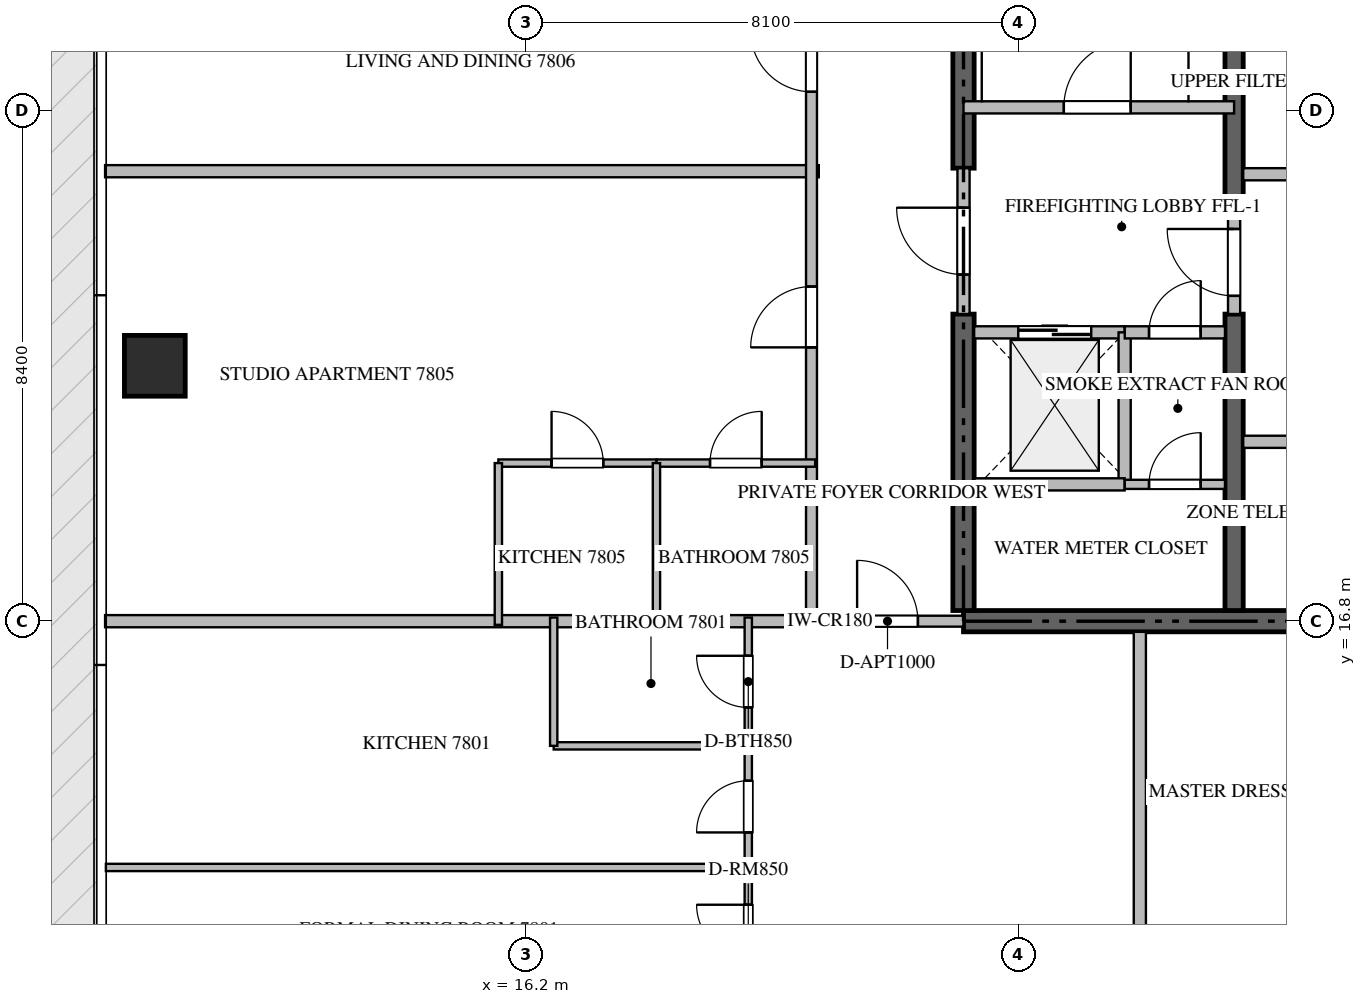
"""IFC4 building model, lengths in metres.
Left out: names, types, materials, properties, quantities, classifications, styles, units other than length and angle.
Written with IfcOpenShell. Run it as: python <this file> out.ifc"""

import sys

from ifc_helpers import new_model, si_unit, direction, frame, frame_2d, origin, origin_2d, place, context, subcontext, project, spatial, rectangle, extrude, source, transform, mapped, element, fill, save


model = new_model("IFC4")
c1 = context("Model", 3, precision=1e-05, world=origin(), true_north=direction((0.0, 1.0)))
c2 = subcontext(c1, "Body", "Model", "MODEL_VIEW")
j1 = project(units=[si_unit("LENGTHUNIT", "METRE"), si_unit("PLANEANGLEUNIT", "RADIAN")], contexts=[c1])
p1 = place(None, origin())
s1 = spatial("IfcSite", under=j1, at=p1, CompositionType="ELEMENT")
p2 = place(p1, origin())
s2 = spatial("IfcBuilding", under=s1, at=p2, CompositionType="ELEMENT")
p3 = place(p2, frame((0.0, 0.0, 313.7)))
s3 = spatial("IfcBuildingStorey", under=s2, at=p3, CompositionType="ELEMENT", Elevation=313.7)
p4 = place(p3, frame((23.4, 16.8, -0.26), z_axis=(0.0, 0.0, 1.0), x_axis=(1.0, 0.0, 0.0)))
e1 = element("IfcWall", 1, at=p4, inside=s3, PredefinedType="SHEAR", context=c2, shape_type="SweptSolid", body=[
    extrude(rectangle(XDim=18.0, YDim=0.35, at=frame_2d((9.0, 0.0))), origin(), (0.0, 0.0, 1.0), 4.048),
])
p5 = place(p3, frame((23.4, 16.975, -0.26), z_axis=(0.0, 0.0, 1.0), x_axis=(0.0, 1.0, 0.0)))
e2 = element("IfcWall", 2, at=p5, inside=s3, PredefinedType="SHEAR", context=c2, shape_type="SweptSolid", body=[
    extrude(rectangle(XDim=4.875, YDim=0.35, at=frame_2d((2.438, 0.0))), origin(), (0.0, 0.0, 1.0), 4.048),
])
p6 = place(p3, frame((23.4, 24.25, -0.26), z_axis=(0.0, 0.0, 1.0), x_axis=(0.0, 1.0, 0.0)))
e3 = element("IfcWall", 3, at=p6, inside=s3, PredefinedType="SHEAR", context=c2, shape_type="SweptSolid", body=[
    extrude(rectangle(XDim=9.175, YDim=0.35, at=frame_2d((4.587, 0.0))), origin(), (0.0, 0.0, 1.0), 4.048),
])
p7 = place(p3, frame((27.85, 16.975, -0.26), z_axis=(0.0, 0.0, 1.0), x_axis=(0.0, 1.0, 0.0)))
e4 = element("IfcWall", 4, at=p7, inside=s3, PredefinedType="SHEAR", context=c2, shape_type="SweptSolid", body=[
    extrude(rectangle(XDim=4.875, YDim=0.3, at=frame_2d((2.438, 0.0))), origin(), (0.0, 0.0, 1.0), 4.048),
])
p8 = place(p3, frame((27.85, 23.55, -0.26), z_axis=(0.0, 0.0, 1.0), x_axis=(0.0, 1.0, 0.0)))
e5 = element("IfcWall", 5, at=p8, inside=s3, PredefinedType="SHEAR", context=c2, shape_type="SweptSolid", body=[
    extrude(rectangle(XDim=9.875, YDim=0.3, at=frame_2d((4.938, 0.0))), origin(), (0.0, 0.0, 1.0), 4.048),
])
m1 = source(origin(), c2, "Body", "SweptSolid", [
    extrude(rectangle(XDim=1.0, YDim=1.0, at=origin_2d()), origin(), (0.0, 0.0, 1.0), 4.05),
])
p9 = place(p3, frame((10.1, 21.0, -0.26), z_axis=(0.0, 0.0, 1.0), x_axis=(1.0, 0.0, 0.0)))
e6 = element("IfcColumn", 6, at=p9, inside=s3, PredefinedType="COLUMN", context=c2, shape_type="MappedRepresentation", body=[
    mapped(m1, transform((0.0, 0.0, 0.0), scale=1.0)),
])
p10 = place(p3, frame((23.4, 25.25, 0.0), z_axis=(0.0, 0.0, 1.0), x_axis=(1.0, 0.0, 0.0)))
e7 = element("IfcWall", 7, at=p10, inside=s3, PredefinedType="STANDARD", context=c2, shape_type="SweptSolid", body=[
    extrude(rectangle(XDim=4.45, YDim=0.2, at=frame_2d((2.225, 0.0))), origin(), (0.0, 0.0, 1.0), 3.79),
])
p11 = place(p10, frame((1.65, 0.0, 0.0)))
e8 = element("IfcOpeningElement", 8, at=p11, cuts=e7, PredefinedType="OPENING", context=c2, shape_type="SweptSolid", body=[
    extrude(rectangle(XDim=1.1, YDim=2.15, at=frame_2d((0.55, 1.075))), frame((0.0, 0.11, 0.0), z_axis=(0.0, -1.0, 0.0), x_axis=(1.0, 0.0, 0.0)), (0.0, 0.0, 1.0), 0.22),
])
p12 = place(p3, frame((23.575, 21.55, 0.0), z_axis=(0.0, 0.0, 1.0), x_axis=(1.0, 0.0, 0.0)))
e9 = element("IfcWall", 9, at=p12, inside=s3, PredefinedType="STANDARD", context=c2, shape_type="SweptSolid", body=[
    extrude(rectangle(XDim=2.475, YDim=0.2, at=frame_2d((1.238, 0.0))), origin(), (0.0, 0.0, 1.0), 3.79),
])
p13 = place(p12, frame((0.725, 0.0, 0.0)))
e10 = element("IfcOpeningElement", 10, at=p13, cuts=e9, PredefinedType="OPENING", context=c2, shape_type="SweptSolid", body=[
    extrude(rectangle(XDim=1.2, YDim=2.2, at=frame_2d((0.6, 1.1))), frame((0.0, 0.11, 0.0), z_axis=(0.0, -1.0, 0.0), x_axis=(1.0, 0.0, 0.0)), (0.0, 0.0, 1.0), 0.22),
])
p14 = place(p3, frame((26.05, 19.05, 0.0), z_axis=(0.0, 0.0, 1.0), x_axis=(0.0, 1.0, 0.0)))
e11 = element("IfcWall", 11, at=p14, inside=s3, PredefinedType="STANDARD", context=c2, shape_type="SweptSolid", body=[
    extrude(rectangle(XDim=2.5, YDim=0.2, at=frame_2d((1.25, 0.0))), origin(), (0.0, 0.0, 1.0), 3.79),
])
p15 = place(p3, frame((23.575, 19.05, 0.0), z_axis=(0.0, 0.0, 1.0), x_axis=(1.0, 0.0, 0.0)))
e12 = element("IfcWall", 12, at=p15, inside=s3, PredefinedType="STANDARD", context=c2, shape_type="SweptSolid", body=[
    extrude(rectangle(XDim=2.475, YDim=0.2, at=frame_2d((1.238, 0.0))), origin(), (0.0, 0.0, 1.0), 3.79),
])
p16 = place(p3, frame((26.052, 21.55, 0.0), z_axis=(0.0, 0.0, 1.0), x_axis=(1.0, 0.0, 0.0)))
e13 = element("IfcWall", 13, at=p16, inside=s3, PredefinedType="STANDARD", context=c2, shape_type="SweptSolid", body=[
    extrude(rectangle(XDim=1.648, YDim=0.2, at=frame_2d((0.824, 0.0))), origin(), (0.0, 0.0, 1.0), 3.79),
])
p17 = place(p16, frame((0.399, 0.0, 0.0)))
e14 = element("IfcOpeningElement", 14, at=p17, cuts=e13, PredefinedType="OPENING", context=c2, shape_type="SweptSolid", body=[
    extrude(rectangle(XDim=0.85, YDim=2.1, at=frame_2d((0.425, 1.05))), frame((0.0, 0.11, 0.0), z_axis=(0.0, -1.0, 0.0), x_axis=(1.0, 0.0, 0.0)), (0.0, 0.0, 1.0), 0.22),
])
p18 = place(p3, frame((23.4, 21.852, 0.0), z_axis=(0.0, 0.0, 1.0), x_axis=(0.0, 1.0, 0.0)))
e15 = element("IfcWall", 15, at=p18, inside=s3, PredefinedType="STANDARD", context=c2, shape_type="SweptSolid", body=[
    extrude(rectangle(XDim=2.396, YDim=0.2, at=frame_2d((1.198, 0.0))), origin(), (0.0, 0.0, 1.0), 3.79),
])
p19 = place(p18, frame((0.648, 0.0, 0.0)))
e16 = element("IfcOpeningElement", 16, at=p19, cuts=e15, PredefinedType="OPENING", context=c2, shape_type="SweptSolid", body=[
    extrude(rectangle(XDim=1.1, YDim=2.15, at=frame_2d((0.55, 1.075))), frame((0.0, 0.11, 0.0), z_axis=(0.0, -1.0, 0.0), x_axis=(1.0, 0.0, 0.0)), (0.0, 0.0, 1.0), 0.22),
])
p20 = place(p3, frame((27.85, 21.852, 0.0), z_axis=(0.0, 0.0, 1.0), x_axis=(0.0, 1.0, 0.0)))
e17 = element("IfcWall", 17, at=p20, inside=s3, PredefinedType="STANDARD", context=c2, shape_type="SweptSolid", body=[
    extrude(rectangle(XDim=1.696, YDim=0.2, at=frame_2d((0.848, 0.0))), origin(), (0.0, 0.0, 1.0), 3.79),
])
p21 = place(p20, frame((0.298, 0.0, 0.0)))
e18 = element("IfcOpeningElement", 18, at=p21, cuts=e17, PredefinedType="OPENING", context=c2, shape_type="SweptSolid", body=[
    extrude(rectangle(XDim=1.1, YDim=2.15, at=frame_2d((0.55, 1.075))), frame((0.0, 0.11, 0.0), z_axis=(0.0, -1.0, 0.0), x_axis=(1.0, 0.0, 0.0)), (0.0, 0.0, 1.0), 0.22),
])
p22 = place(p3, frame((26.052, 19.05, 0.0), z_axis=(0.0, 0.0, 1.0), x_axis=(1.0, 0.0, 0.0)))
e19 = element("IfcWall", 19, at=p22, inside=s3, PredefinedType="PARTITIONING", context=c2, shape_type="SweptSolid", body=[
    extrude(rectangle(XDim=1.648, YDim=0.15, at=frame_2d((0.824, 0.0))), origin(), (0.0, 0.0, 1.0), 3.79),
])
p23 = place(p22, frame((0.399, 0.0, 0.0)))
e20 = element("IfcOpeningElement", 20, at=p23, cuts=e19, PredefinedType="OPENING", context=c2, shape_type="SweptSolid", body=[
    extrude(rectangle(XDim=0.85, YDim=2.1, at=frame_2d((0.425, 1.05))), frame((0.0, 0.085, 0.0), z_axis=(0.0, -1.0, 0.0), x_axis=(1.0, 0.0, 0.0)), (0.0, 0.0, 1.0), 0.17),
])
p24 = place(p3, frame((28.0, 19.75, 0.0), z_axis=(0.0, 0.0, 1.0), x_axis=(1.0, 0.0, 0.0)))
e21 = element("IfcWall", 21, at=p24, inside=s3, PredefinedType="STANDARD", context=c2, shape_type="SweptSolid", body=[
    extrude(rectangle(XDim=6.0, YDim=0.2, at=frame_2d((3.0, 0.0))), origin(), (0.0, 0.0, 1.0), 3.79),
])
p25 = place(p24, frame((2.55, 0.0, 0.0)))
e22 = element("IfcOpeningElement", 22, at=p25, cuts=e21, PredefinedType="OPENING", context=c2, shape_type="SweptSolid", body=[
    extrude(rectangle(XDim=0.9, YDim=2.1, at=frame_2d((0.45, 1.05))), frame((0.0, 0.11, 0.0), z_axis=(0.0, -1.0, 0.0), x_axis=(1.0, 0.0, 0.0)), (0.0, 0.0, 1.0), 0.22),
])
p26 = place(p3, frame((28.0, 24.15, 0.0), z_axis=(0.0, 0.0, 1.0), x_axis=(1.0, 0.0, 0.0)))
e23 = element("IfcWall", 23, at=p26, inside=s3, PredefinedType="STANDARD", context=c2, shape_type="SweptSolid", body=[
    extrude(rectangle(XDim=4.48, YDim=0.2, at=frame_2d((2.24, 0.0))), origin(), (0.0, 0.0, 1.0), 3.79),
])
p27 = place(p26, frame((1.79, 0.0, 0.0)))
e24 = element("IfcOpeningElement", 24, at=p27, cuts=e23, PredefinedType="OPENING", context=c2, shape_type="SweptSolid", body=[
    extrude(rectangle(XDim=0.9, YDim=2.1, at=frame_2d((0.45, 1.05))), frame((0.0, 0.11, 0.0), z_axis=(0.0, -1.0, 0.0), x_axis=(1.0, 0.0, 0.0)), (0.0, 0.0, 1.0), 0.22),
])
p28 = place(p3, frame((26.3, 2.482, 0.0), z_axis=(0.0, 0.0, 1.0), x_axis=(0.0, 1.0, 0.0)))
e25 = element("IfcWall", 25, at=p28, inside=s3, PredefinedType="PARTITIONING", context=c2, shape_type="SweptSolid", body=[
    extrude(rectangle(XDim=14.143, YDim=0.2, at=frame_2d((7.072, 0.0))), origin(), (0.0, 0.0, 1.0), 3.79),
])
p29 = place(p3, frame((9.282, 24.2, 0.0), z_axis=(0.0, 0.0, 1.0), x_axis=(1.0, 0.0, 0.0)))
e26 = element("IfcWall", 26, at=p29, inside=s3, PredefinedType="PARTITIONING", context=c2, shape_type="SweptSolid", body=[
    extrude(rectangle(XDim=11.738, YDim=0.2, at=frame_2d((5.869, 0.0))), origin(), (0.0, 0.0, 1.0), 3.79),
])
p30 = place(p3, frame((9.282, 16.8, 0.0), z_axis=(0.0, 0.0, 1.0), x_axis=(1.0, 0.0, 0.0)))
e27 = element("IfcWall", 27, at=p30, inside=s3, PredefinedType="PARTITIONING", context=c2, shape_type="SweptSolid", body=[
    extrude(rectangle(XDim=11.618, YDim=0.2, at=frame_2d((5.809, 0.0))), origin(), (0.0, 0.0, 1.0), 3.79),
])
p31 = place(p3, frame((20.902, 16.8, 0.0), z_axis=(0.0, 0.0, 1.0), x_axis=(1.0, 0.0, 0.0)))
e28 = element("IfcWall", 28, at=p31, inside=s3, PredefinedType="PARTITIONING", context=c2, shape_type="SweptSolid", body=[
    extrude(rectangle(XDim=2.496, YDim=0.18, at=frame_2d((1.248, 0.0))), origin(), (0.0, 0.0, 1.0), 3.79),
])
p32 = place(p31, frame((0.748, 0.0, 0.0)))
e29 = element("IfcOpeningElement", 29, at=p32, cuts=e28, PredefinedType="OPENING", context=c2, shape_type="SweptSolid", body=[
    extrude(rectangle(XDim=1.0, YDim=2.15, at=frame_2d((0.5, 1.075))), frame((0.0, 0.1, 0.0), z_axis=(0.0, -1.0, 0.0), x_axis=(1.0, 0.0, 0.0)), (0.0, 0.0, 1.0), 0.2),
])
p33 = place(p3, frame((20.9, 16.8, 0.0), z_axis=(0.0, 0.0, 1.0), x_axis=(0.0, 1.0, 0.0)))
e30 = element("IfcWall", 30, at=p33, inside=s3, PredefinedType="PARTITIONING", context=c2, shape_type="SweptSolid", body=[
    extrude(rectangle(XDim=16.8, YDim=0.18, at=frame_2d((8.4, 0.0))), origin(), (0.0, 0.0, 1.0), 3.79),
])
p34 = place(p33, frame((4.503, 0.0, 0.0)))
e31 = element("IfcOpeningElement", 31, at=p34, cuts=e30, PredefinedType="OPENING", context=c2, shape_type="SweptSolid", body=[
    extrude(rectangle(XDim=1.0, YDim=2.15, at=frame_2d((0.5, 1.075))), frame((0.0, 0.1, 0.0), z_axis=(0.0, -1.0, 0.0), x_axis=(1.0, 0.0, 0.0)), (0.0, 0.0, 1.0), 0.2),
])
p35 = place(p33, frame((8.706, 0.0, 0.0)))
e32 = element("IfcOpeningElement", 32, at=p35, cuts=e30, PredefinedType="OPENING", context=c2, shape_type="SweptSolid", body=[
    extrude(rectangle(XDim=1.0, YDim=2.15, at=frame_2d((0.5, 1.075))), frame((0.0, 0.1, 0.0), z_axis=(0.0, -1.0, 0.0), x_axis=(1.0, 0.0, 0.0)), (0.0, 0.0, 1.0), 0.2),
])
p36 = place(p3, frame((9.295, 12.75, 0.0), z_axis=(0.0, 0.0, 1.0), x_axis=(1.0, 0.0, 0.0)))
e33 = element("IfcWall", 33, at=p36, inside=s3, PredefinedType="PARTITIONING", context=c2, shape_type="SweptSolid", body=[
    extrude(rectangle(XDim=10.565, YDim=0.12, at=frame_2d((5.283, 0.0))), origin(), (0.0, 0.0, 1.0), 3.79),
])
p37 = place(p3, frame((16.66, 14.75, 0.0), z_axis=(0.0, 0.0, 1.0), x_axis=(1.0, 0.0, 0.0)))
e34 = element("IfcWall", 34, at=p37, inside=s3, PredefinedType="PARTITIONING", context=c2, shape_type="SweptSolid", body=[
    extrude(rectangle(XDim=3.2, YDim=0.12, at=frame_2d((1.6, 0.0))), origin(), (0.0, 0.0, 1.0), 3.79),
])
p38 = place(p3, frame((16.66, 14.75, 0.0), z_axis=(0.0, 0.0, 1.0), x_axis=(0.0, 1.0, 0.0)))
e35 = element("IfcWall", 35, at=p38, inside=s3, PredefinedType="PARTITIONING", context=c2, shape_type="SweptSolid", body=[
    extrude(rectangle(XDim=2.11, YDim=0.12, at=frame_2d((1.055, 0.0))), origin(), (0.0, 0.0, 1.0), 3.79),
])
p39 = place(p3, frame((19.86, 10.674, 0.0), z_axis=(0.0, 0.0, 1.0), x_axis=(0.0, 1.0, 0.0)))
e36 = element("IfcWall", 36, at=p39, inside=s3, PredefinedType="PARTITIONING", context=c2, shape_type="SweptSolid", body=[
    extrude(rectangle(XDim=2.076, YDim=0.12, at=frame_2d((1.038, 0.0))), origin(), (0.0, 0.0, 1.0), 3.79),
])
p40 = place(p39, frame((0.613, 0.0, 0.0)))
e37 = element("IfcOpeningElement", 37, at=p40, cuts=e36, PredefinedType="OPENING", context=c2, shape_type="SweptSolid", body=[
    extrude(rectangle(XDim=0.85, YDim=2.1, at=frame_2d((0.425, 1.05))), frame((0.0, 0.07, 0.0), z_axis=(0.0, -1.0, 0.0), x_axis=(1.0, 0.0, 0.0)), (0.0, 0.0, 1.0), 0.14),
])
p41 = place(p3, frame((19.86, 12.752, 0.0), z_axis=(0.0, 0.0, 1.0), x_axis=(0.0, 1.0, 0.0)))
e38 = element("IfcWall", 38, at=p41, inside=s3, PredefinedType="PARTITIONING", context=c2, shape_type="SweptSolid", body=[
    extrude(rectangle(XDim=1.998, YDim=0.12, at=frame_2d((0.999, 0.0))), origin(), (0.0, 0.0, 1.0), 3.79),
])
p42 = place(p41, frame((0.574, 0.0, 0.0)))
e39 = element("IfcOpeningElement", 39, at=p42, cuts=e38, PredefinedType="OPENING", context=c2, shape_type="SweptSolid", body=[
    extrude(rectangle(XDim=0.85, YDim=2.1, at=frame_2d((0.425, 1.05))), frame((0.0, 0.07, 0.0), z_axis=(0.0, -1.0, 0.0), x_axis=(1.0, 0.0, 0.0)), (0.0, 0.0, 1.0), 0.14),
])
p43 = place(p3, frame((19.86, 14.752, 0.0), z_axis=(0.0, 0.0, 1.0), x_axis=(0.0, 1.0, 0.0)))
e40 = element("IfcWall", 40, at=p43, inside=s3, PredefinedType="PARTITIONING", context=c2, shape_type="SweptSolid", body=[
    extrude(rectangle(XDim=2.108, YDim=0.12, at=frame_2d((1.054, 0.0))), origin(), (0.0, 0.0, 1.0), 3.79),
])
p44 = place(p43, frame((0.629, 0.0, 0.0)))
e41 = element("IfcOpeningElement", 41, at=p44, cuts=e40, PredefinedType="OPENING", context=c2, shape_type="SweptSolid", body=[
    extrude(rectangle(XDim=0.85, YDim=2.1, at=frame_2d((0.425, 1.05))), frame((0.0, 0.07, 0.0), z_axis=(0.0, -1.0, 0.0), x_axis=(1.0, 0.0, 0.0)), (0.0, 0.0, 1.0), 0.14),
])
p45 = place(p3, frame((15.75, 19.4, 0.0), z_axis=(0.0, 0.0, 1.0), x_axis=(1.0, 0.0, 0.0)))
e42 = element("IfcWall", 42, at=p45, inside=s3, PredefinedType="PARTITIONING", context=c2, shape_type="SweptSolid", body=[
    extrude(rectangle(XDim=2.6, YDim=0.12, at=frame_2d((1.3, 0.0))), origin(), (0.0, 0.0, 1.0), 3.79),
])
p46 = place(p45, frame((0.875, 0.0, 0.0)))
e43 = element("IfcOpeningElement", 43, at=p46, cuts=e42, PredefinedType="OPENING", context=c2, shape_type="SweptSolid", body=[
    extrude(rectangle(XDim=0.85, YDim=2.1, at=frame_2d((0.425, 1.05))), frame((0.0, 0.07, 0.0), z_axis=(0.0, -1.0, 0.0), x_axis=(1.0, 0.0, 0.0)), (0.0, 0.0, 1.0), 0.14),
])
p47 = place(p3, frame((18.352, 19.4, 0.0), z_axis=(0.0, 0.0, 1.0), x_axis=(1.0, 0.0, 0.0)))
e44 = element("IfcWall", 44, at=p47, inside=s3, PredefinedType="PARTITIONING", context=c2, shape_type="SweptSolid", body=[
    extrude(rectangle(XDim=2.608, YDim=0.12, at=frame_2d((1.304, 0.0))), origin(), (0.0, 0.0, 1.0), 3.79),
])
p48 = place(p47, frame((0.879, 0.0, 0.0)))
e45 = element("IfcOpeningElement", 45, at=p48, cuts=e44, PredefinedType="OPENING", context=c2, shape_type="SweptSolid", body=[
    extrude(rectangle(XDim=0.85, YDim=2.1, at=frame_2d((0.425, 1.05))), frame((0.0, 0.07, 0.0), z_axis=(0.0, -1.0, 0.0), x_axis=(1.0, 0.0, 0.0)), (0.0, 0.0, 1.0), 0.14),
])
for number, where, z_axis, x_axis in (
    (46, (18.35, 16.74, 0.0), (0.0, 0.0, 1.0), (0.0, 1.0, 0.0)),
    (47, (15.75, 16.74, 0.0), (0.0, 0.0, 1.0), (0.0, 1.0, 0.0)),
):
    element("IfcWall", number, at=place(p3, frame(where, z_axis=z_axis, x_axis=x_axis)), inside=s3, PredefinedType="PARTITIONING", context=c2, shape_type="SweptSolid", body=[
        extrude(rectangle(XDim=2.66, YDim=0.12, at=frame_2d((1.33, 0.0))), origin(), (0.0, 0.0, 1.0), 3.79),
    ])
m2 = source(origin(), c2, "Body", "SweptSolid", [
    extrude(rectangle(XDim=1.1, YDim=2.15, at=frame_2d((0.55, 1.075))), frame((0.0, 0.025, 0.0), z_axis=(0.0, -1.0, 0.0), x_axis=(1.0, 0.0, 0.0)), (0.0, 0.0, 1.0), 0.05),
])
p49 = place(p11, origin())
e48 = element("IfcDoor", 48, at=p49, inside=s3, OperationType="SINGLE_SWING_RIGHT", PredefinedType="DOOR", context=c2, shape_type="MappedRepresentation", body=[
    mapped(m2, transform((0.0, 0.0, 0.0), scale=1.0)),
])
fill(e8, e48)
m3 = source(origin(), c2, "Body", "SweptSolid", [
    extrude(rectangle(XDim=1.2, YDim=2.2, at=frame_2d((0.6, 1.1))), frame((0.0, 0.025, 0.0), z_axis=(0.0, -1.0, 0.0), x_axis=(1.0, 0.0, 0.0)), (0.0, 0.0, 1.0), 0.05),
])
p50 = place(p13, origin())
e49 = element("IfcDoor", 49, at=p50, inside=s3, OperationType="DOUBLE_DOOR_SLIDING", PredefinedType="DOOR", context=c2, shape_type="MappedRepresentation", body=[
    mapped(m3, transform((0.0, 0.0, 0.0), scale=1.0)),
])
fill(e10, e49)
m4 = source(origin(), c2, "Body", "SweptSolid", [
    extrude(rectangle(XDim=0.85, YDim=2.1, at=frame_2d((0.425, 1.05))), frame((0.0, 0.025, 0.0), z_axis=(0.0, -1.0, 0.0), x_axis=(1.0, 0.0, 0.0)), (0.0, 0.0, 1.0), 0.05),
])
p51 = place(p17, origin())
e50 = element("IfcDoor", 50, at=p51, inside=s3, OperationType="SINGLE_SWING_RIGHT", PredefinedType="DOOR", context=c2, shape_type="MappedRepresentation", body=[
    mapped(m4, transform((0.0, 0.0, 0.0), scale=1.0)),
])
fill(e14, e50)
p52 = place(p19, origin())
e51 = element("IfcDoor", 51, at=p52, inside=s3, OperationType="SINGLE_SWING_RIGHT", PredefinedType="DOOR", context=c2, shape_type="MappedRepresentation", body=[
    mapped(m2, transform((0.0, 0.0, 0.0), scale=1.0)),
])
fill(e16, e51)
p53 = place(p21, origin())
e52 = element("IfcDoor", 52, at=p53, inside=s3, OperationType="SINGLE_SWING_RIGHT", PredefinedType="DOOR", context=c2, shape_type="MappedRepresentation", body=[
    mapped(m2, transform((0.0, 0.0, 0.0), scale=1.0)),
])
fill(e18, e52)
p54 = place(p23, origin())
e53 = element("IfcDoor", 53, at=p54, inside=s3, OperationType="SINGLE_SWING_RIGHT", PredefinedType="DOOR", context=c2, shape_type="MappedRepresentation", body=[
    mapped(m4, transform((0.0, 0.0, 0.0), scale=1.0)),
])
fill(e20, e53)
m5 = source(origin(), c2, "Body", "SweptSolid", [
    extrude(rectangle(XDim=1.0, YDim=2.15, at=frame_2d((0.5, 1.075))), frame((0.0, 0.025, 0.0), z_axis=(0.0, -1.0, 0.0), x_axis=(1.0, 0.0, 0.0)), (0.0, 0.0, 1.0), 0.05),
])
p55 = place(p32, origin())
e54 = element("IfcDoor", 54, at=p55, inside=s3, OperationType="SINGLE_SWING_LEFT", PredefinedType="DOOR", context=c2, shape_type="MappedRepresentation", body=[
    mapped(m5, transform((0.0, 0.0, 0.0), scale=1.0)),
])
fill(e29, e54)
p56 = place(p34, origin())
e55 = element("IfcDoor", 55, at=p56, inside=s3, OperationType="SINGLE_SWING_LEFT", PredefinedType="DOOR", context=c2, shape_type="MappedRepresentation", body=[
    mapped(m5, transform((0.0, 0.0, 0.0), scale=1.0)),
])
fill(e31, e55)
p57 = place(p35, origin())
e56 = element("IfcDoor", 56, at=p57, inside=s3, OperationType="SINGLE_SWING_RIGHT", PredefinedType="DOOR", context=c2, shape_type="MappedRepresentation", body=[
    mapped(m5, transform((0.0, 0.0, 0.0), scale=1.0)),
])
fill(e32, e56)
p58 = place(p40, origin())
e57 = element("IfcDoor", 57, at=p58, inside=s3, OperationType="SINGLE_SWING_RIGHT", PredefinedType="DOOR", context=c2, shape_type="MappedRepresentation", body=[
    mapped(m4, transform((0.0, 0.0, 0.0), scale=1.0)),
])
fill(e37, e57)
p59 = place(p42, origin())
e58 = element("IfcDoor", 58, at=p59, inside=s3, OperationType="SINGLE_SWING_LEFT", PredefinedType="DOOR", context=c2, shape_type="MappedRepresentation", body=[
    mapped(m4, transform((0.0, 0.0, 0.0), scale=1.0)),
])
fill(e39, e58)
p60 = place(p44, origin())
e59 = element("IfcDoor", 59, at=p60, inside=s3, OperationType="SINGLE_SWING_RIGHT", PredefinedType="DOOR", context=c2, shape_type="MappedRepresentation", body=[
    mapped(m4, transform((0.0, 0.0, 0.0), scale=1.0)),
])
fill(e41, e59)
p61 = place(p46, origin())
e60 = element("IfcDoor", 60, at=p61, inside=s3, OperationType="SINGLE_SWING_LEFT", PredefinedType="DOOR", context=c2, shape_type="MappedRepresentation", body=[
    mapped(m4, transform((0.0, 0.0, 0.0), scale=1.0)),
])
fill(e43, e60)
p62 = place(p48, origin())
e61 = element("IfcDoor", 61, at=p62, inside=s3, OperationType="SINGLE_SWING_RIGHT", PredefinedType="DOOR", context=c2, shape_type="MappedRepresentation", body=[
    mapped(m4, transform((0.0, 0.0, 0.0), scale=1.0)),
])
fill(e45, e61)
save(model, sys.argv[1])
